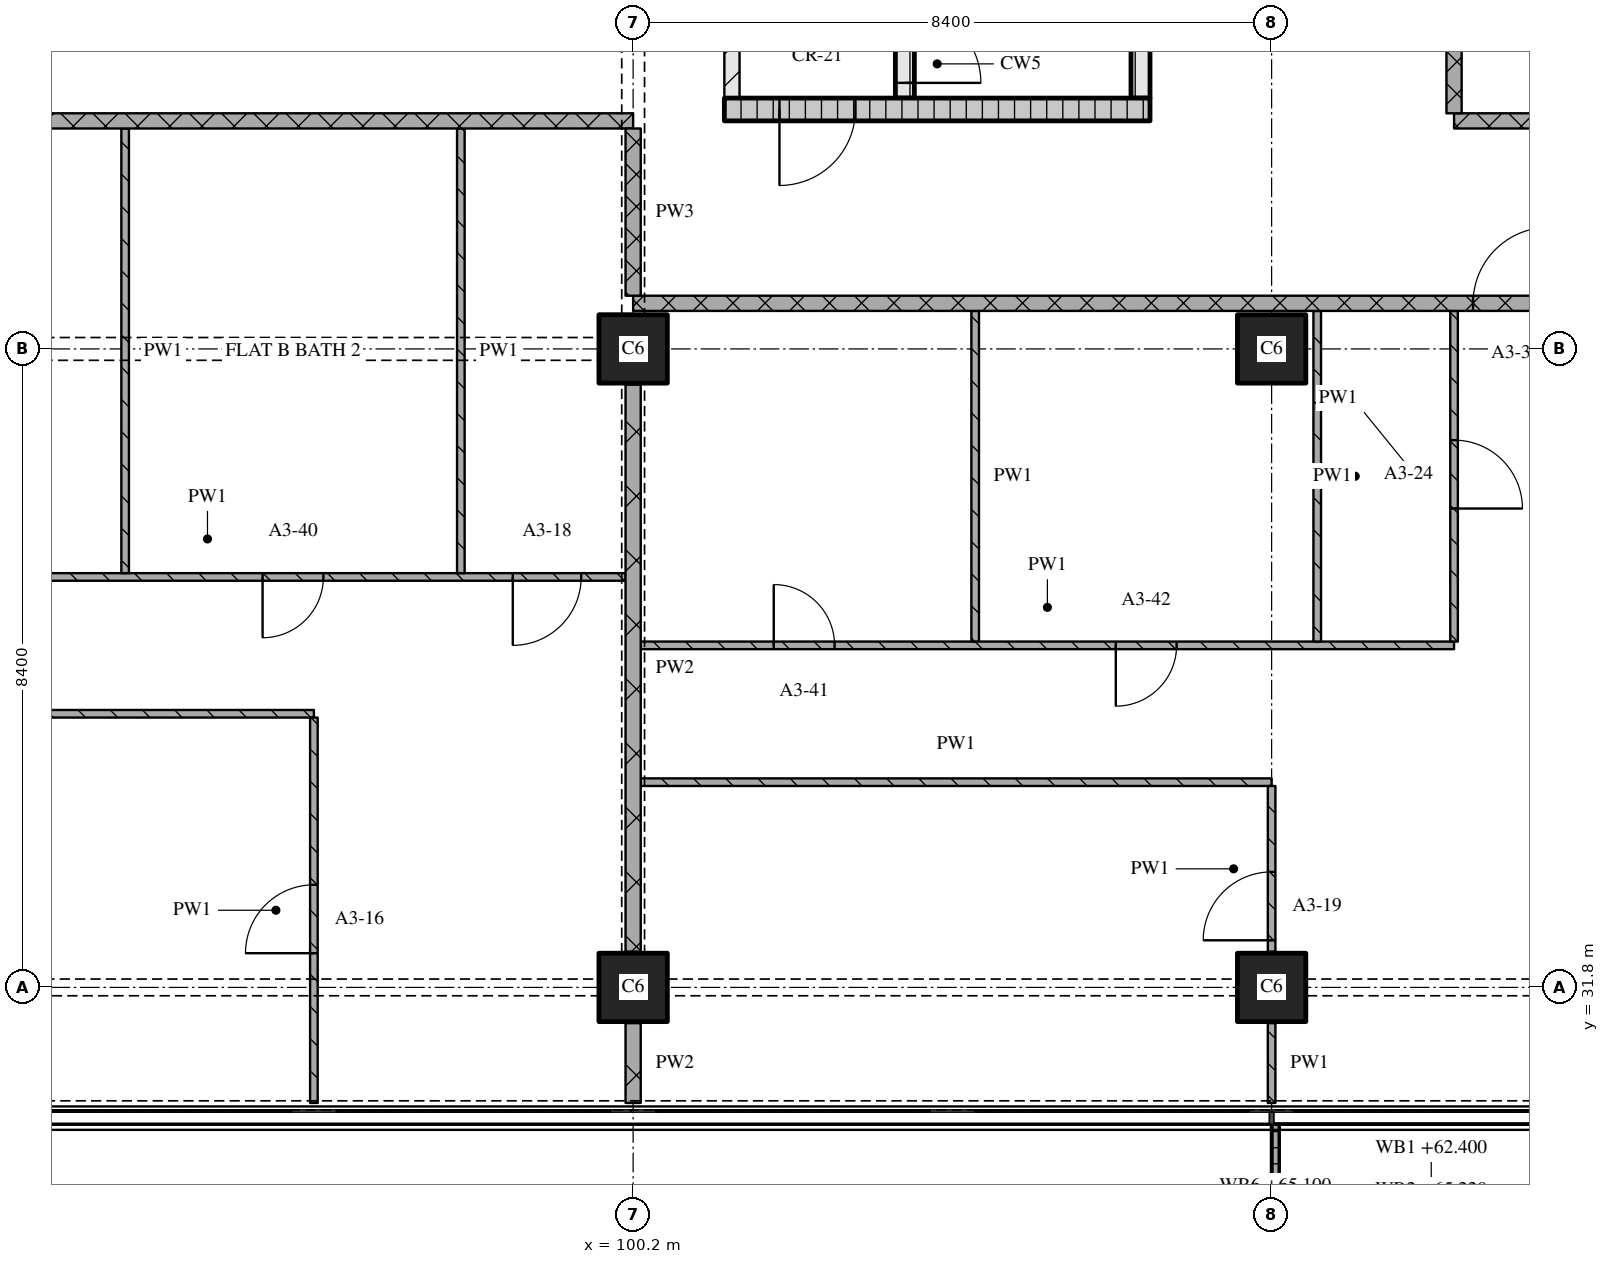
"""IFC4 building model, lengths in metres.
Left out: names, types, materials, properties, quantities, classifications, styles, units other than length and angle.
Written with IfcOpenShell. Run it as: python <this file> out.ifc"""

import sys

from ifc_helpers import new_model, si_unit, direction, frame, frame_2d, origin, origin_2d, place, context, subcontext, project, spatial, polyline, rectangle, outline, extrude, element, fill, save


model = new_model("IFC4")
c1 = context("Model", 3, precision=1e-05, world=origin(), true_north=direction((0.0, 1.0)))
c2 = subcontext(c1, "Body", "Model", "MODEL_VIEW")
j1 = project(units=[si_unit("LENGTHUNIT", "METRE"), si_unit("PLANEANGLEUNIT", "RADIAN")], contexts=[c1])
p1 = place(None, origin())
s1 = spatial("IfcSite", under=j1, at=p1, CompositionType="ELEMENT")
p2 = place(p1, origin())
s2 = spatial("IfcBuilding", under=s1, at=p2, CompositionType="ELEMENT")
p3 = place(p2, frame((0.0, 0.0, 62.4)))
s3 = spatial("IfcBuildingStorey", under=s2, at=p3, CompositionType="ELEMENT", Elevation=62.4)
for number, where, z_axis, x_axis in (
    (1, (100.2, 31.8, 0.0), (0.0, 0.0, 1.0), (1.0, 0.0, 0.0)),
    (2, (100.2, 40.2, 0.0), (0.0, 0.0, 1.0), (1.0, 0.0, 0.0)),
    (3, (108.6, 31.8, 0.0), (0.0, 0.0, 1.0), (1.0, 0.0, 0.0)),
    (4, (108.6, 40.2, 0.0), (0.0, 0.0, 1.0), (1.0, 0.0, 0.0)),
):
    element("IfcColumn", number, at=place(p3, frame(where, z_axis=z_axis, x_axis=x_axis)), inside=s3, PredefinedType="COLUMN", context=c2, shape_type="SweptSolid", body=[
        extrude(rectangle(XDim=0.9, YDim=0.9, at=origin_2d()), origin(), (0.0, 0.0, 1.0), 3.6),
    ])
p4 = place(p3, origin())
e5 = element("IfcWall", 5, at=p4, inside=s3, PredefinedType="SOLIDWALL", context=c2, shape_type="SweptSolid", body=[
    extrude(outline(polyline([(108.6, 30.0), (108.7, 30.0), (108.7, 28.367), (112.7, 28.367), (112.7, 30.0), (112.8, 30.0), (112.8, 28.267), (108.6, 28.267), (108.6, 30.0)])), origin(), (0.0, 0.0, 1.0), 1.0),
])
p5 = place(p3, frame((101.4, 43.35, 0.0), z_axis=(0.0, 0.0, 1.0), x_axis=(1.0, 0.0, 0.0)))
e6 = element("IfcWall", 6, at=p5, inside=s3, PredefinedType="SOLIDWALL", context=c2, shape_type="SweptSolid", body=[
    extrude(rectangle(XDim=5.6, YDim=0.3, at=frame_2d((2.8, 0.0))), origin(), (0.0, 0.0, 1.0), 3.32),
])
p6 = place(p5, frame((0.725, 0.0, 0.0)))
e7 = element("IfcOpeningElement", 7, at=p6, cuts=e6, PredefinedType="OPENING", context=c2, shape_type="SweptSolid", body=[
    extrude(rectangle(XDim=1.0, YDim=2.1, at=frame_2d((0.5, 1.05))), frame((0.0, 0.16, 0.0), z_axis=(0.0, -1.0, 0.0), x_axis=(1.0, 0.0, 0.0)), (0.0, 0.0, 1.0), 0.32),
])
p7 = place(p3, frame((101.5, 43.5, 0.0), z_axis=(0.0, 0.0, 1.0), x_axis=(0.0, 1.0, 0.0)))
e8 = element("IfcWall", 8, at=p7, inside=s3, PredefinedType="PARTITIONING", context=c2, shape_type="SweptSolid", body=[
    extrude(rectangle(XDim=6.9, YDim=0.2, at=frame_2d((3.45, 0.0))), origin(), (0.0, 0.0, 1.0), 3.32),
])
p8 = place(p7, frame((1.0, 0.0, 0.0)))
e9 = element("IfcOpeningElement", 9, at=p8, cuts=e8, PredefinedType="OPENING", context=c2, shape_type="SweptSolid", body=[
    extrude(rectangle(XDim=1.0, YDim=2.1, at=frame_2d((0.5, 1.05))), frame((0.0, 0.11, 0.0), z_axis=(0.0, -1.0, 0.0), x_axis=(1.0, 0.0, 0.0)), (0.0, 0.0, 1.0), 0.22),
])
p9 = place(p3, frame((103.775, 43.5, 0.0), z_axis=(0.0, 0.0, 1.0), x_axis=(0.0, 1.0, 0.0)))
e10 = element("IfcWall", 10, at=p9, inside=s3, PredefinedType="SOLIDWALL", context=c2, shape_type="SweptSolid", body=[
    extrude(rectangle(XDim=6.9, YDim=0.25, at=frame_2d((3.45, 0.0))), origin(), (0.0, 0.0, 1.0), 3.32),
])
p10 = place(p9, frame((0.2, 0.0, 0.0)))
e11 = element("IfcOpeningElement", 11, at=p10, cuts=e10, PredefinedType="OPENING", context=c2, shape_type="SweptSolid", body=[
    extrude(rectangle(XDim=1.0, YDim=2.1, at=frame_2d((0.5, 1.05))), frame((0.0, 0.135, 0.0), z_axis=(0.0, -1.0, 0.0), x_axis=(1.0, 0.0, 0.0)), (0.0, 0.0, 1.0), 0.27),
])
p11 = place(p3, frame((106.875, 43.5, 0.0), z_axis=(0.0, 0.0, 1.0), x_axis=(0.0, 1.0, 0.0)))
e12 = element("IfcWall", 12, at=p11, inside=s3, PredefinedType="SOLIDWALL", context=c2, shape_type="SweptSolid", body=[
    extrude(rectangle(XDim=6.9, YDim=0.25, at=frame_2d((3.45, 0.0))), origin(), (0.0, 0.0, 1.0), 3.32),
])
p12 = place(p3, frame((100.3, 34.5, 0.0), z_axis=(0.0, 0.0, 1.0), x_axis=(1.0, 0.0, 0.0)))
e13 = element("IfcWall", 13, at=p12, inside=s3, PredefinedType="PARTITIONING", context=c2, shape_type="SweptSolid", body=[
    extrude(rectangle(XDim=8.3, YDim=0.1, at=frame_2d((4.15, 0.0))), origin(), (0.0, 0.0, 1.0), 3.32),
])
p13 = place(p3, frame((96.0, 35.4, 0.0), z_axis=(0.0, 0.0, 1.0), x_axis=(-1.0, 0.0, 0.0)))
e14 = element("IfcWall", 14, at=p13, inside=s3, PredefinedType="PARTITIONING", context=c2, shape_type="SweptSolid", body=[
    extrude(rectangle(XDim=20.9, YDim=0.1, at=frame_2d((10.45, 0.0))), origin(), (0.0, 0.0, 1.0), 3.32),
])
p14 = place(p13, frame((12.15, 0.0, 0.0)))
e15 = element("IfcOpeningElement", 15, at=p14, cuts=e14, PredefinedType="OPENING", context=c2, shape_type="SweptSolid", body=[
    extrude(rectangle(XDim=0.9, YDim=2.1, at=frame_2d((0.45, 1.05))), frame((0.0, 0.06, 0.0), z_axis=(0.0, -1.0, 0.0), x_axis=(1.0, 0.0, 0.0)), (0.0, 0.0, 1.0), 0.12),
])
p15 = place(p13, frame((18.45, 0.0, 0.0)))
e16 = element("IfcOpeningElement", 16, at=p15, cuts=e14, PredefinedType="OPENING", context=c2, shape_type="SweptSolid", body=[
    extrude(rectangle(XDim=0.9, YDim=2.1, at=frame_2d((0.45, 1.05))), frame((0.0, 0.06, 0.0), z_axis=(0.0, -1.0, 0.0), x_axis=(1.0, 0.0, 0.0)), (0.0, 0.0, 1.0), 0.12),
])
p16 = place(p3, frame((100.3, 36.3, 0.0), z_axis=(0.0, 0.0, 1.0), x_axis=(1.0, 0.0, 0.0)))
e17 = element("IfcWall", 17, at=p16, inside=s3, PredefinedType="PARTITIONING", context=c2, shape_type="SweptSolid", body=[
    extrude(rectangle(XDim=10.7, YDim=0.1, at=frame_2d((5.35, 0.0))), origin(), (0.0, 0.0, 1.0), 3.32),
])
p17 = place(p16, frame((1.75, 0.0, 0.0)))
e18 = element("IfcOpeningElement", 18, at=p17, cuts=e17, PredefinedType="OPENING", context=c2, shape_type="SweptSolid", body=[
    extrude(rectangle(XDim=0.8, YDim=2.1, at=frame_2d((0.4, 1.05))), frame((0.0, 0.06, 0.0), z_axis=(0.0, -1.0, 0.0), x_axis=(1.0, 0.0, 0.0)), (0.0, 0.0, 1.0), 0.12),
])
p18 = place(p16, frame((6.25, 0.0, 0.0)))
e19 = element("IfcOpeningElement", 19, at=p18, cuts=e17, PredefinedType="OPENING", context=c2, shape_type="SweptSolid", body=[
    extrude(rectangle(XDim=0.8, YDim=2.1, at=frame_2d((0.4, 1.05))), frame((0.0, 0.06, 0.0), z_axis=(0.0, -1.0, 0.0), x_axis=(1.0, 0.0, 0.0)), (0.0, 0.0, 1.0), 0.12),
])
p19 = place(p3, frame((89.1, 37.2, 0.0), z_axis=(0.0, 0.0, 1.0), x_axis=(1.0, 0.0, 0.0)))
e20 = element("IfcWall", 20, at=p19, inside=s3, PredefinedType="PARTITIONING", context=c2, shape_type="SweptSolid", body=[
    extrude(rectangle(XDim=11.0, YDim=0.1, at=frame_2d((5.5, 0.0))), origin(), (0.0, 0.0, 1.0), 3.32),
])
p20 = place(p19, frame((6.225, 0.0, 0.0)))
e21 = element("IfcOpeningElement", 21, at=p20, cuts=e20, PredefinedType="OPENING", context=c2, shape_type="SweptSolid", body=[
    extrude(rectangle(XDim=0.8, YDim=2.1, at=frame_2d((0.4, 1.05))), frame((0.0, 0.06, 0.0), z_axis=(0.0, -1.0, 0.0), x_axis=(1.0, 0.0, 0.0)), (0.0, 0.0, 1.0), 0.12),
])
p21 = place(p19, frame((9.517, 0.0, 0.0)))
e22 = element("IfcOpeningElement", 22, at=p21, cuts=e20, PredefinedType="OPENING", context=c2, shape_type="SweptSolid", body=[
    extrude(rectangle(XDim=0.9, YDim=2.1, at=frame_2d((0.45, 1.05))), frame((0.0, 0.06, 0.0), z_axis=(0.0, -1.0, 0.0), x_axis=(1.0, 0.0, 0.0)), (0.0, 0.0, 1.0), 0.12),
])
p22 = place(p3, frame((124.28, 40.8, 0.0), z_axis=(0.0, 0.0, 1.0), x_axis=(-1.0, 0.0, 0.0)))
e23 = element("IfcWall", 23, at=p22, inside=s3, PredefinedType="PARTITIONING", context=c2, shape_type="SweptSolid", body=[
    extrude(rectangle(XDim=24.08, YDim=0.2, at=frame_2d((12.04, 0.0))), origin(), (0.0, 0.0, 1.0), 3.32),
])
p23 = place(p22, frame((12.03, 0.0, 0.0)))
e24 = element("IfcOpeningElement", 24, at=p23, cuts=e23, PredefinedType="OPENING", context=c2, shape_type="SweptSolid", body=[
    extrude(rectangle(XDim=1.0, YDim=2.1, at=frame_2d((0.5, 1.05))), frame((0.0, 0.11, 0.0), z_axis=(0.0, -1.0, 0.0), x_axis=(1.0, 0.0, 0.0)), (0.0, 0.0, 1.0), 0.22),
])
p24 = place(p3, frame((100.2, 43.2, 0.0), z_axis=(0.0, 0.0, 1.0), x_axis=(-1.0, 0.0, 0.0)))
e25 = element("IfcWall", 25, at=p24, inside=s3, PredefinedType="PARTITIONING", context=c2, shape_type="SweptSolid", body=[
    extrude(rectangle(XDim=25.2, YDim=0.2, at=frame_2d((12.6, 0.0))), origin(), (0.0, 0.0, 1.0), 3.32),
])
p25 = place(p24, frame((11.35, 0.0, 0.0)))
e26 = element("IfcOpeningElement", 26, at=p25, cuts=e25, PredefinedType="OPENING", context=c2, shape_type="SweptSolid", body=[
    extrude(rectangle(XDim=1.0, YDim=2.1, at=frame_2d((0.5, 1.05))), frame((0.0, 0.11, 0.0), z_axis=(0.0, -1.0, 0.0), x_axis=(1.0, 0.0, 0.0)), (0.0, 0.0, 1.0), 0.22),
])
p26 = place(p3, frame((111.0, 43.2, 0.0), z_axis=(0.0, 0.0, 1.0), x_axis=(1.0, 0.0, 0.0)))
e27 = element("IfcWall", 27, at=p26, inside=s3, PredefinedType="PARTITIONING", context=c2, shape_type="SweptSolid", body=[
    extrude(rectangle(XDim=15.92, YDim=0.2, at=frame_2d((7.96, 0.0))), origin(), (0.0, 0.0, 1.0), 3.32),
])
p27 = place(p3, frame((93.517, 43.1, 0.0), z_axis=(0.0, 0.0, 1.0), x_axis=(0.0, -1.0, 0.0)))
e28 = element("IfcWall", 28, at=p27, inside=s3, PredefinedType="PARTITIONING", context=c2, shape_type="SweptSolid", body=[
    extrude(rectangle(XDim=5.85, YDim=0.1, at=frame_2d((2.925, 0.0))), origin(), (0.0, 0.0, 1.0), 3.32),
])
p28 = place(p3, frame((96.0, 30.28, 0.0), z_axis=(0.0, 0.0, 1.0), x_axis=(0.0, 1.0, 0.0)))
e29 = element("IfcWall", 29, at=p28, inside=s3, PredefinedType="PARTITIONING", context=c2, shape_type="SweptSolid", body=[
    extrude(rectangle(XDim=5.07, YDim=0.1, at=frame_2d((2.535, 0.0))), origin(), (0.0, 0.0, 1.0), 3.32),
])
p29 = place(p28, frame((1.97, 0.0, 0.0)))
e30 = element("IfcOpeningElement", 30, at=p29, cuts=e29, PredefinedType="OPENING", context=c2, shape_type="SweptSolid", body=[
    extrude(rectangle(XDim=0.9, YDim=2.1, at=frame_2d((0.45, 1.05))), frame((0.0, 0.06, 0.0), z_axis=(0.0, -1.0, 0.0), x_axis=(1.0, 0.0, 0.0)), (0.0, 0.0, 1.0), 0.12),
])
p30 = place(p3, frame((97.933, 43.1, 0.0), z_axis=(0.0, 0.0, 1.0), x_axis=(0.0, -1.0, 0.0)))
e31 = element("IfcWall", 31, at=p30, inside=s3, PredefinedType="PARTITIONING", context=c2, shape_type="SweptSolid", body=[
    extrude(rectangle(XDim=5.85, YDim=0.1, at=frame_2d((2.925, 0.0))), origin(), (0.0, 0.0, 1.0), 3.32),
])
p31 = place(p3, frame((100.2, 43.1, 0.0), z_axis=(0.0, 0.0, 1.0), x_axis=(0.0, -1.0, 0.0)))
e32 = element("IfcWall", 32, at=p31, inside=s3, PredefinedType="PARTITIONING", context=c2, shape_type="SweptSolid", body=[
    extrude(rectangle(XDim=2.2, YDim=0.2, at=frame_2d((1.1, 0.0))), origin(), (0.0, 0.0, 1.0), 2.43),
])
p32 = place(p3, frame((100.2, 31.33, 0.0), z_axis=(0.0, 0.0, 1.0), x_axis=(0.0, -1.0, 0.0)))
e33 = element("IfcWall", 33, at=p32, inside=s3, PredefinedType="PARTITIONING", context=c2, shape_type="SweptSolid", body=[
    extrude(rectangle(XDim=1.05, YDim=0.2, at=frame_2d((0.525, 0.0))), origin(), (0.0, 0.0, 1.0), 3.32),
])
p33 = place(p3, frame((100.2, 39.73, 0.0), z_axis=(0.0, 0.0, 1.0), x_axis=(0.0, -1.0, 0.0)))
e34 = element("IfcWall", 34, at=p33, inside=s3, PredefinedType="PARTITIONING", context=c2, shape_type="SweptSolid", body=[
    extrude(rectangle(XDim=7.46, YDim=0.2, at=frame_2d((3.73, 0.0))), origin(), (0.0, 0.0, 1.0), 2.83),
])
p34 = place(p3, frame((104.7, 40.7, 0.0), z_axis=(0.0, 0.0, 1.0), x_axis=(0.0, -1.0, 0.0)))
e35 = element("IfcWall", 35, at=p34, inside=s3, PredefinedType="PARTITIONING", context=c2, shape_type="SweptSolid", body=[
    extrude(rectangle(XDim=4.35, YDim=0.1, at=frame_2d((2.175, 0.0))), origin(), (0.0, 0.0, 1.0), 3.32),
])
p35 = place(p3, frame((108.6, 31.33, 0.0), z_axis=(0.0, 0.0, 1.0), x_axis=(0.0, -1.0, 0.0)))
e36 = element("IfcWall", 36, at=p35, inside=s3, PredefinedType="PARTITIONING", context=c2, shape_type="SweptSolid", body=[
    extrude(rectangle(XDim=1.05, YDim=0.1, at=frame_2d((0.525, 0.0))), origin(), (0.0, 0.0, 1.0), 3.32),
])
p36 = place(p3, frame((108.6, 32.27, 0.0), z_axis=(0.0, 0.0, 1.0), x_axis=(0.0, 1.0, 0.0)))
e37 = element("IfcWall", 37, at=p36, inside=s3, PredefinedType="PARTITIONING", context=c2, shape_type="SweptSolid", body=[
    extrude(rectangle(XDim=2.18, YDim=0.1, at=frame_2d((1.09, 0.0))), origin(), (0.0, 0.0, 1.0), 3.32),
])
p37 = place(p36, frame((0.15, 0.0, 0.0)))
e38 = element("IfcOpeningElement", 38, at=p37, cuts=e37, PredefinedType="OPENING", context=c2, shape_type="SweptSolid", body=[
    extrude(rectangle(XDim=0.9, YDim=2.1, at=frame_2d((0.45, 1.05))), frame((0.0, 0.06, 0.0), z_axis=(0.0, -1.0, 0.0), x_axis=(1.0, 0.0, 0.0)), (0.0, 0.0, 1.0), 0.12),
])
p38 = place(p3, frame((109.2, 40.7, 0.0), z_axis=(0.0, 0.0, 1.0), x_axis=(0.0, -1.0, 0.0)))
e39 = element("IfcWall", 39, at=p38, inside=s3, PredefinedType="PARTITIONING", context=c2, shape_type="SweptSolid", body=[
    extrude(rectangle(XDim=4.35, YDim=0.1, at=frame_2d((2.175, 0.0))), origin(), (0.0, 0.0, 1.0), 3.32),
])
p39 = place(p3, frame((111.0, 75.32, 0.0), z_axis=(0.0, 0.0, 1.0), x_axis=(0.0, -1.0, 0.0)))
e40 = element("IfcWall", 40, at=p39, inside=s3, PredefinedType="PARTITIONING", context=c2, shape_type="SweptSolid", body=[
    extrude(rectangle(XDim=32.02, YDim=0.2, at=frame_2d((16.01, 0.0))), origin(), (0.0, 0.0, 1.0), 3.32),
])
p40 = place(p39, frame((6.27, 0.0, 0.0)))
e41 = element("IfcOpeningElement", 41, at=p40, cuts=e40, PredefinedType="OPENING", context=c2, shape_type="SweptSolid", body=[
    extrude(rectangle(XDim=1.0, YDim=2.1, at=frame_2d((0.5, 1.05))), frame((0.0, 0.11, 0.0), z_axis=(0.0, -1.0, 0.0), x_axis=(1.0, 0.0, 0.0)), (0.0, 0.0, 1.0), 0.22),
])
p41 = place(p39, frame((22.47, 0.0, 0.0)))
e42 = element("IfcOpeningElement", 42, at=p41, cuts=e40, PredefinedType="OPENING", context=c2, shape_type="SweptSolid", body=[
    extrude(rectangle(XDim=1.0, YDim=2.1, at=frame_2d((0.5, 1.05))), frame((0.0, 0.11, 0.0), z_axis=(0.0, -1.0, 0.0), x_axis=(1.0, 0.0, 0.0)), (0.0, 0.0, 1.0), 0.22),
])
p42 = place(p3, frame((111.0, 36.35, 0.0), z_axis=(0.0, 0.0, 1.0), x_axis=(0.0, 1.0, 0.0)))
e43 = element("IfcWall", 43, at=p42, inside=s3, PredefinedType="PARTITIONING", context=c2, shape_type="SweptSolid", body=[
    extrude(rectangle(XDim=4.35, YDim=0.1, at=frame_2d((2.175, 0.0))), origin(), (0.0, 0.0, 1.0), 3.32),
])
p43 = place(p42, frame((1.75, 0.0, 0.0)))
e44 = element("IfcOpeningElement", 44, at=p43, cuts=e43, PredefinedType="OPENING", context=c2, shape_type="SweptSolid", body=[
    extrude(rectangle(XDim=0.9, YDim=2.1, at=frame_2d((0.45, 1.05))), frame((0.0, 0.06, 0.0), z_axis=(0.0, -1.0, 0.0), x_axis=(1.0, 0.0, 0.0)), (0.0, 0.0, 1.0), 0.12),
])
p44 = place(p6, origin())
e45 = element("IfcDoor", 45, at=p44, inside=s3, OperationType="SINGLE_SWING_RIGHT", PredefinedType="DOOR", context=c2, shape_type="SweptSolid", body=[
    extrude(rectangle(XDim=1.0, YDim=2.1, at=frame_2d((0.5, 1.05))), frame((0.0, 0.025, 0.0), z_axis=(0.0, -1.0, 0.0), x_axis=(1.0, 0.0, 0.0)), (0.0, 0.0, 1.0), 0.05),
])
fill(e7, e45)
p45 = place(p10, origin())
e46 = element("IfcDoor", 46, at=p45, inside=s3, OperationType="SINGLE_SWING_RIGHT", PredefinedType="DOOR", context=c2, shape_type="SweptSolid", body=[
    extrude(rectangle(XDim=1.0, YDim=2.1, at=frame_2d((0.5, 1.05))), frame((0.0, 0.025, 0.0), z_axis=(0.0, -1.0, 0.0), x_axis=(1.0, 0.0, 0.0)), (0.0, 0.0, 1.0), 0.05),
])
fill(e11, e46)
p46 = place(p17, origin())
e47 = element("IfcDoor", 47, at=p46, inside=s3, OperationType="SINGLE_SWING_LEFT", PredefinedType="DOOR", context=c2, shape_type="SweptSolid", body=[
    extrude(rectangle(XDim=0.8, YDim=2.1, at=frame_2d((0.4, 1.05))), frame((0.0, 0.025, 0.0), z_axis=(0.0, -1.0, 0.0), x_axis=(1.0, 0.0, 0.0)), (0.0, 0.0, 1.0), 0.05),
])
fill(e18, e47)
p47 = place(p18, origin())
e48 = element("IfcDoor", 48, at=p47, inside=s3, OperationType="SINGLE_SWING_RIGHT", PredefinedType="DOOR", context=c2, shape_type="SweptSolid", body=[
    extrude(rectangle(XDim=0.8, YDim=2.1, at=frame_2d((0.4, 1.05))), frame((0.0, 0.025, 0.0), z_axis=(0.0, -1.0, 0.0), x_axis=(1.0, 0.0, 0.0)), (0.0, 0.0, 1.0), 0.05),
])
fill(e19, e48)
p48 = place(p20, origin())
e49 = element("IfcDoor", 49, at=p48, inside=s3, OperationType="SINGLE_SWING_RIGHT", PredefinedType="DOOR", context=c2, shape_type="SweptSolid", body=[
    extrude(rectangle(XDim=0.8, YDim=2.1, at=frame_2d((0.4, 1.05))), frame((0.0, 0.025, 0.0), z_axis=(0.0, -1.0, 0.0), x_axis=(1.0, 0.0, 0.0)), (0.0, 0.0, 1.0), 0.05),
])
fill(e21, e49)
p49 = place(p21, origin())
e50 = element("IfcDoor", 50, at=p49, inside=s3, OperationType="SINGLE_SWING_RIGHT", PredefinedType="DOOR", context=c2, shape_type="SweptSolid", body=[
    extrude(rectangle(XDim=0.9, YDim=2.1, at=frame_2d((0.45, 1.05))), frame((0.0, 0.025, 0.0), z_axis=(0.0, -1.0, 0.0), x_axis=(1.0, 0.0, 0.0)), (0.0, 0.0, 1.0), 0.05),
])
fill(e22, e50)
p50 = place(p23, origin())
e51 = element("IfcDoor", 51, at=p50, inside=s3, OperationType="SINGLE_SWING_RIGHT", PredefinedType="DOOR", context=c2, shape_type="SweptSolid", body=[
    extrude(rectangle(XDim=1.0, YDim=2.1, at=frame_2d((0.5, 1.05))), frame((0.0, 0.025, 0.0), z_axis=(0.0, -1.0, 0.0), x_axis=(1.0, 0.0, 0.0)), (0.0, 0.0, 1.0), 0.05),
])
fill(e24, e51)
p51 = place(p29, origin())
e52 = element("IfcDoor", 52, at=p51, inside=s3, OperationType="SINGLE_SWING_LEFT", PredefinedType="DOOR", context=c2, shape_type="SweptSolid", body=[
    extrude(rectangle(XDim=0.9, YDim=2.1, at=frame_2d((0.45, 1.05))), frame((0.0, 0.025, 0.0), z_axis=(0.0, -1.0, 0.0), x_axis=(1.0, 0.0, 0.0)), (0.0, 0.0, 1.0), 0.05),
])
fill(e30, e52)
p52 = place(p37, origin())
e53 = element("IfcDoor", 53, at=p52, inside=s3, OperationType="SINGLE_SWING_LEFT", PredefinedType="DOOR", context=c2, shape_type="SweptSolid", body=[
    extrude(rectangle(XDim=0.9, YDim=2.1, at=frame_2d((0.45, 1.05))), frame((0.0, 0.025, 0.0), z_axis=(0.0, -1.0, 0.0), x_axis=(1.0, 0.0, 0.0)), (0.0, 0.0, 1.0), 0.05),
])
fill(e38, e53)
p53 = place(p43, origin())
e54 = element("IfcDoor", 54, at=p53, inside=s3, OperationType="SINGLE_SWING_RIGHT", PredefinedType="DOOR", context=c2, shape_type="SweptSolid", body=[
    extrude(rectangle(XDim=0.9, YDim=2.1, at=frame_2d((0.45, 1.05))), frame((0.0, 0.025, 0.0), z_axis=(0.0, -1.0, 0.0), x_axis=(1.0, 0.0, 0.0)), (0.0, 0.0, 1.0), 0.05),
])
fill(e44, e54)
save(model, sys.argv[1])
